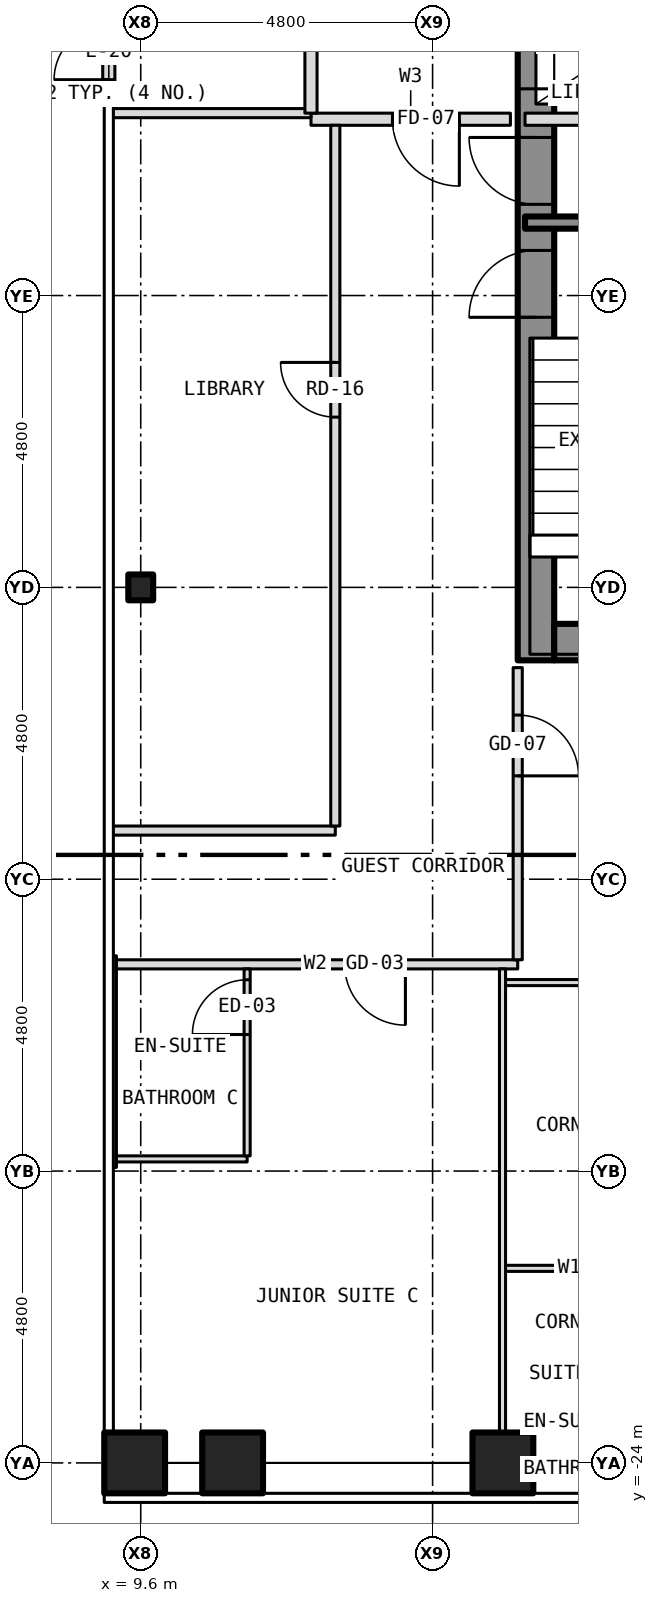
"""IFC4 building model, lengths in metres.
Left out: names, types, materials, properties, quantities, classifications, styles, units other than length and angle.
Written with IfcOpenShell. Run it as: python <this file> out.ifc"""

import sys

from ifc_helpers import new_model, si_unit, direction, frame, frame_2d, origin, origin_2d, place, context, subcontext, project, spatial, rectangle, hollow_rectangle, i_section, extrude, element, fill, save


model = new_model("IFC4")
c1 = context("Model", 3, precision=1e-05, world=origin(), true_north=direction((0.0, 1.0)))
c2 = subcontext(c1, "Body", "Model", "MODEL_VIEW")
j1 = project(units=[si_unit("LENGTHUNIT", "METRE"), si_unit("PLANEANGLEUNIT", "RADIAN")], contexts=[c1])
p1 = place(None, origin())
s1 = spatial("IfcSite", under=j1, at=p1, CompositionType="ELEMENT")
p2 = place(p1, origin())
s2 = spatial("IfcBuilding", under=s1, at=p2, CompositionType="ELEMENT")
p3 = place(p2, frame((0.0, 0.0, 63.5)))
s3 = spatial("IfcBuildingStorey", under=s2, at=p3, CompositionType="ELEMENT", Elevation=63.5)
for number, where, z_axis, x_axis in (
    (1, (11.111, -24.0, -0.15), (0.0, 0.0, 1.0), (1.0, 0.0, 0.0)),
    (2, (15.556, -24.0, -0.15), (0.0, 0.0, 1.0), (1.0, 0.0, 0.0)),
    (3, (9.5, -24.0, -0.15), (0.0, 0.0, 1.0), (1.0, 0.0, 0.0)),
):
    element("IfcColumn", number, at=place(p3, frame(where, z_axis=z_axis, x_axis=x_axis)), inside=s3, PredefinedType="COLUMN", context=c2, shape_type="SweptSolid", body=[
        extrude(hollow_rectangle(XDim=1.0, YDim=1.0, WallThickness=0.06, at=origin_2d()), origin(), (0.0, 0.0, 1.0), 3.5),
    ])
p4 = place(p3, frame((9.6, -9.6, -0.15), z_axis=(0.0, 0.0, 1.0), x_axis=(1.0, 0.0, 0.0)))
e4 = element("IfcColumn", 4, at=p4, inside=s3, PredefinedType="COLUMN", context=c2, shape_type="SweptSolid", body=[
    extrude(i_section(OverallWidth=0.409, OverallDepth=0.424, WebThickness=0.033, FlangeThickness=0.052, at=origin_2d()), origin(), (0.0, 0.0, 1.0), 3.5),
])
p5 = place(p3, frame((16.1, -10.8, 0.0), z_axis=(0.0, 0.0, 1.0), x_axis=(0.0, 1.0, 0.0)))
e5 = element("IfcWall", 5, at=p5, inside=s3, PredefinedType="SHEAR", context=c2, shape_type="SweptSolid", body=[
    extrude(rectangle(XDim=21.6, YDim=0.6, at=frame_2d((10.8, 0.0))), origin(), (0.0, 0.0, 1.0), 3.25),
])
p6 = place(p5, frame((9.4, 0.0, 0.0)))
e6 = element("IfcOpeningElement", 6, at=p6, cuts=e5, PredefinedType="OPENING", context=c2, shape_type="SweptSolid", body=[
    extrude(rectangle(XDim=1.1, YDim=2.1, at=frame_2d((0.55, 1.05))), frame((0.0, 0.312, 0.0), z_axis=(0.0, -1.0, 0.0), x_axis=(1.0, 0.0, 0.0)), (0.0, 0.0, 1.0), 0.624),
])
p7 = place(p5, frame((11.5, 0.0, 0.0)))
e7 = element("IfcOpeningElement", 7, at=p7, cuts=e5, PredefinedType="OPENING", context=c2, shape_type="SweptSolid", body=[
    extrude(rectangle(XDim=1.1, YDim=2.1, at=frame_2d((0.55, 1.05))), frame((0.0, 0.312, 0.0), z_axis=(0.0, -1.0, 0.0), x_axis=(1.0, 0.0, 0.0)), (0.0, 0.0, 1.0), 0.624),
])
p8 = place(p5, frame((13.6, 0.0, 0.0)))
e8 = element("IfcOpeningElement", 8, at=p8, cuts=e5, PredefinedType="OPENING", context=c2, shape_type="SweptSolid", body=[
    extrude(rectangle(XDim=1.1, YDim=2.1, at=frame_2d((0.55, 1.05))), frame((0.0, 0.312, 0.0), z_axis=(0.0, -1.0, 0.0), x_axis=(1.0, 0.0, 0.0)), (0.0, 0.0, 1.0), 0.624),
])
p9 = place(p5, frame((15.7, 0.0, 0.0)))
e9 = element("IfcOpeningElement", 9, at=p9, cuts=e5, PredefinedType="OPENING", context=c2, shape_type="SweptSolid", body=[
    extrude(rectangle(XDim=1.1, YDim=2.1, at=frame_2d((0.55, 1.05))), frame((0.0, 0.312, 0.0), z_axis=(0.0, -1.0, 0.0), x_axis=(1.0, 0.0, 0.0)), (0.0, 0.0, 1.0), 0.624),
])
p10 = place(p5, frame((17.8, 0.0, 0.0)))
e10 = element("IfcOpeningElement", 10, at=p10, cuts=e5, PredefinedType="OPENING", context=c2, shape_type="SweptSolid", body=[
    extrude(rectangle(XDim=1.1, YDim=2.1, at=frame_2d((0.55, 1.05))), frame((0.0, 0.312, 0.0), z_axis=(0.0, -1.0, 0.0), x_axis=(1.0, 0.0, 0.0)), (0.0, 0.0, 1.0), 0.624),
])
p11 = place(p5, frame((5.642, 0.0, 0.0)))
e11 = element("IfcOpeningElement", 11, at=p11, cuts=e5, PredefinedType="OPENING", context=c2, shape_type="SweptSolid", body=[
    extrude(rectangle(XDim=1.1, YDim=2.1, at=frame_2d((0.55, 1.05))), frame((0.0, 0.312, 0.0), z_axis=(0.0, -1.0, 0.0), x_axis=(1.0, 0.0, 0.0)), (0.0, 0.0, 1.0), 0.624),
])
p12 = place(p5, frame((7.5, 0.0, 0.0)))
e12 = element("IfcOpeningElement", 12, at=p12, cuts=e5, PredefinedType="OPENING", context=c2, shape_type="SweptSolid", body=[
    extrude(rectangle(XDim=1.1, YDim=2.1, at=frame_2d((0.55, 1.05))), frame((0.0, 0.312, 0.0), z_axis=(0.0, -1.0, 0.0), x_axis=(1.0, 0.0, 0.0)), (0.0, 0.0, 1.0), 0.624),
])
p13 = place(p3, frame((16.4, -10.5, 0.0), z_axis=(0.0, 0.0, 1.0), x_axis=(1.0, 0.0, 0.0)))
e13 = element("IfcWall", 13, at=p13, inside=s3, PredefinedType="SHEAR", context=c2, shape_type="SweptSolid", body=[
    extrude(rectangle(XDim=7.0, YDim=0.6, at=frame_2d((3.5, 0.0))), origin(), (0.0, 0.0, 1.0), 3.25),
])
p14 = place(p3, frame((9.075, -1.4, 0.0), z_axis=(0.0, 0.0, 1.0), x_axis=(0.0, 1.0, 0.0)))
e14 = element("IfcWall", 14, at=p14, inside=s3, PredefinedType="SOLIDWALL", context=c2, shape_type="SweptSolid", body=[
    extrude(rectangle(XDim=2.8, YDim=0.2, at=frame_2d((1.4, 0.0))), origin(), (0.0, 0.0, 1.0), 3.5),
])
p15 = place(p14, frame((0.15, 0.0, 0.0)))
e15 = element("IfcOpeningElement", 15, at=p15, cuts=e14, PredefinedType="OPENING", context=c2, shape_type="SweptSolid", body=[
    extrude(rectangle(XDim=0.9, YDim=2.1, at=frame_2d((0.45, 1.05))), frame((0.0, 0.112, 0.0), z_axis=(0.0, -1.0, 0.0), x_axis=(1.0, 0.0, 0.0)), (0.0, 0.0, 1.0), 0.224),
])
p16 = place(p14, frame((1.75, 0.0, 0.0)))
e16 = element("IfcOpeningElement", 16, at=p16, cuts=e14, PredefinedType="OPENING", context=c2, shape_type="SweptSolid", body=[
    extrude(rectangle(XDim=0.9, YDim=2.1, at=frame_2d((0.45, 1.05))), frame((0.0, 0.112, 0.0), z_axis=(0.0, -1.0, 0.0), x_axis=(1.0, 0.0, 0.0)), (0.0, 0.0, 1.0), 0.224),
])
p17 = place(p3, frame((15.55, -20.8, 0.0), z_axis=(0.0, 0.0, 1.0), x_axis=(1.0, 0.0, 0.0)))
e17 = element("IfcWall", 17, at=p17, inside=s3, PredefinedType="PARTITIONING", context=c2, shape_type="SweptSolid", body=[
    extrude(rectangle(XDim=2.2, YDim=0.1, at=frame_2d((1.1, 0.0))), origin(), (0.0, 0.0, 1.0), 3.35),
])
p18 = place(p3, frame((9.15, -19.0, 0.0), z_axis=(0.0, 0.0, 1.0), x_axis=(1.0, 0.0, 0.0)))
e18 = element("IfcWall", 18, at=p18, inside=s3, PredefinedType="PARTITIONING", context=c2, shape_type="SweptSolid", body=[
    extrude(rectangle(XDim=2.2, YDim=0.1, at=frame_2d((1.1, 0.0))), origin(), (0.0, 0.0, 1.0), 3.35),
])
p19 = place(p3, frame((15.55, -16.1, 0.0), z_axis=(0.0, 0.0, 1.0), x_axis=(1.0, 0.0, 0.0)))
e19 = element("IfcWall", 19, at=p19, inside=s3, PredefinedType="PARTITIONING", context=c2, shape_type="SweptSolid", body=[
    extrude(rectangle(XDim=8.33, YDim=0.1, at=frame_2d((4.165, 0.0))), origin(), (0.0, 0.0, 1.0), 3.35),
])
p20 = place(p19, frame((3.778, 0.0, 0.0)))
e20 = element("IfcOpeningElement", 20, at=p20, cuts=e19, PredefinedType="OPENING", context=c2, shape_type="SweptSolid", body=[
    extrude(rectangle(XDim=0.9, YDim=2.1, at=frame_2d((0.45, 1.05))), frame((0.0, 0.062, 0.0), z_axis=(0.0, -1.0, 0.0), x_axis=(1.0, 0.0, 0.0)), (0.0, 0.0, 1.0), 0.124),
])
p21 = place(p3, frame((9.15, -15.8, 0.0), z_axis=(0.0, 0.0, 1.0), x_axis=(1.0, 0.0, 0.0)))
e21 = element("IfcWall", 21, at=p21, inside=s3, PredefinedType="PARTITIONING", context=c2, shape_type="SweptSolid", body=[
    extrude(rectangle(XDim=6.65, YDim=0.15, at=frame_2d((3.325, 0.0))), origin(), (0.0, 0.0, 1.0), 3.35),
])
p22 = place(p21, frame((3.803, 0.0, 0.0)))
e22 = element("IfcOpeningElement", 22, at=p22, cuts=e21, PredefinedType="OPENING", context=c2, shape_type="SweptSolid", body=[
    extrude(rectangle(XDim=1.0, YDim=2.1, at=frame_2d((0.5, 1.05))), frame((0.0, 0.087, 0.0), z_axis=(0.0, -1.0, 0.0), x_axis=(1.0, 0.0, 0.0)), (0.0, 0.0, 1.0), 0.174),
])
p23 = place(p3, frame((9.12, -13.6, 0.0), z_axis=(0.0, 0.0, 1.0), x_axis=(1.0, 0.0, 0.0)))
e23 = element("IfcWall", 23, at=p23, inside=s3, PredefinedType="PARTITIONING", context=c2, shape_type="SweptSolid", body=[
    extrude(rectangle(XDim=3.68, YDim=0.15, at=frame_2d((1.84, 0.0))), origin(), (0.0, 0.0, 1.0), 3.35),
])
p24 = place(p3, frame((15.92, -3.6, 0.0), z_axis=(0.0, 0.0, 1.0), x_axis=(1.0, 0.0, 0.0)))
e24 = element("IfcWall", 24, at=p24, inside=s3, PredefinedType="SHEAR", context=c2, shape_type="SweptSolid", body=[
    extrude(rectangle(XDim=4.08, YDim=0.2, at=frame_2d((2.04, 0.0))), origin(), (0.0, 0.0, 1.0), 3.25),
])
p25 = place(p3, frame((12.4, -1.9, 0.0), z_axis=(0.0, 0.0, 1.0), x_axis=(1.0, 0.0, 0.0)))
e25 = element("IfcWall", 25, at=p25, inside=s3, PredefinedType="PARTITIONING", context=c2, shape_type="SweptSolid", body=[
    extrude(rectangle(XDim=3.28, YDim=0.2, at=frame_2d((1.64, 0.0))), origin(), (0.0, 0.0, 1.0), 3.35),
])
p26 = place(p25, frame((1.34, 0.0, 0.0)))
e26 = element("IfcOpeningElement", 26, at=p26, cuts=e25, PredefinedType="OPENING", context=c2, shape_type="SweptSolid", body=[
    extrude(rectangle(XDim=1.1, YDim=2.1, at=frame_2d((0.55, 1.05))), frame((0.0, 0.112, 0.0), z_axis=(0.0, -1.0, 0.0), x_axis=(1.0, 0.0, 0.0)), (0.0, 0.0, 1.0), 0.224),
])
p27 = place(p3, frame((15.92, -1.9, 0.0), z_axis=(0.0, 0.0, 1.0), x_axis=(1.0, 0.0, 0.0)))
e27 = element("IfcWall", 27, at=p27, inside=s3, PredefinedType="PARTITIONING", context=c2, shape_type="SweptSolid", body=[
    extrude(rectangle(XDim=7.96, YDim=0.2, at=frame_2d((3.98, 0.0))), origin(), (0.0, 0.0, 1.0), 3.25),
])
p28 = place(p27, frame((3.74, 0.0, 0.0)))
e28 = element("IfcOpeningElement", 28, at=p28, cuts=e27, PredefinedType="OPENING", context=c2, shape_type="SweptSolid", body=[
    extrude(rectangle(XDim=0.9, YDim=2.1, at=frame_2d((0.45, 1.05))), frame((0.0, 0.112, 0.0), z_axis=(0.0, -1.0, 0.0), x_axis=(1.0, 0.0, 0.0)), (0.0, 0.0, 1.0), 0.224),
])
p29 = place(p3, frame((9.12, -1.8, 0.0), z_axis=(0.0, 0.0, 1.0), x_axis=(1.0, 0.0, 0.0)))
e29 = element("IfcWall", 29, at=p29, inside=s3, PredefinedType="PARTITIONING", context=c2, shape_type="SweptSolid", body=[
    extrude(rectangle(XDim=3.28, YDim=0.15, at=frame_2d((1.64, 0.0))), origin(), (0.0, 0.0, 1.0), 3.35),
])
p30 = place(p3, frame((9.15, -19.14, 0.0), z_axis=(0.0, 0.0, 1.0), x_axis=(0.0, 1.0, 0.0)))
e30 = element("IfcWall", 30, at=p30, inside=s3, PredefinedType="PARTITIONING", context=c2, shape_type="SweptSolid", body=[
    extrude(rectangle(XDim=3.48, YDim=0.1, at=frame_2d((1.74, 0.0))), origin(), (0.0, 0.0, 1.0), 2.733),
])
p31 = place(p3, frame((11.35, -18.95, 0.0), z_axis=(0.0, 0.0, 1.0), x_axis=(0.0, 1.0, 0.0)))
e31 = element("IfcWall", 31, at=p31, inside=s3, PredefinedType="PARTITIONING", context=c2, shape_type="SweptSolid", body=[
    extrude(rectangle(XDim=3.075, YDim=0.1, at=frame_2d((1.538, 0.0))), origin(), (0.0, 0.0, 1.0), 3.35),
])
p32 = place(p31, frame((1.996, 0.0, 0.0)))
e32 = element("IfcOpeningElement", 32, at=p32, cuts=e31, PredefinedType="OPENING", context=c2, shape_type="SweptSolid", body=[
    extrude(rectangle(XDim=0.9, YDim=2.1, at=frame_2d((0.45, 1.05))), frame((0.0, 0.062, 0.0), z_axis=(0.0, -1.0, 0.0), x_axis=(1.0, 0.0, 0.0)), (0.0, 0.0, 1.0), 0.124),
])
p33 = place(p3, frame((12.4, -1.8, 0.0), z_axis=(0.0, 0.0, 1.0), x_axis=(0.0, 1.0, 0.0)))
e33 = element("IfcWall", 33, at=p33, inside=s3, PredefinedType="PARTITIONING", context=c2, shape_type="SweptSolid", body=[
    extrude(rectangle(XDim=4.0, YDim=0.2, at=frame_2d((2.0, 0.0))), origin(), (0.0, 0.0, 1.0), 3.35),
])
p34 = place(p33, frame((1.25, 0.0, 0.0)))
e34 = element("IfcOpeningElement", 34, at=p34, cuts=e33, PredefinedType="OPENING", context=c2, shape_type="SweptSolid", body=[
    extrude(rectangle(XDim=1.1, YDim=2.1, at=frame_2d((0.55, 1.05))), frame((0.0, 0.112, 0.0), z_axis=(0.0, -1.0, 0.0), x_axis=(1.0, 0.0, 0.0)), (0.0, 0.0, 1.0), 0.224),
])
p35 = place(p3, frame((12.8, -13.525, 0.0), z_axis=(0.0, 0.0, 1.0), x_axis=(0.0, 1.0, 0.0)))
e35 = element("IfcWall", 35, at=p35, inside=s3, PredefinedType="PARTITIONING", context=c2, shape_type="SweptSolid", body=[
    extrude(rectangle(XDim=11.525, YDim=0.15, at=frame_2d((5.762, 0.0))), origin(), (0.0, 0.0, 1.0), 3.35),
])
p36 = place(p35, frame((6.725, 0.0, 0.0)))
e36 = element("IfcOpeningElement", 36, at=p36, cuts=e35, PredefinedType="OPENING", context=c2, shape_type="SweptSolid", body=[
    extrude(rectangle(XDim=0.9, YDim=2.1, at=frame_2d((0.45, 1.05))), frame((0.0, 0.087, 0.0), z_axis=(0.0, -1.0, 0.0), x_axis=(1.0, 0.0, 0.0)), (0.0, 0.0, 1.0), 0.174),
])
p37 = place(p3, frame((15.55, -23.88, 0.0), z_axis=(0.0, 0.0, 1.0), x_axis=(0.0, 1.0, 0.0)))
e37 = element("IfcWall", 37, at=p37, inside=s3, PredefinedType="PARTITIONING", context=c2, shape_type="SweptSolid", body=[
    extrude(rectangle(XDim=8.005, YDim=0.1, at=frame_2d((4.002, 0.0))), origin(), (0.0, 0.0, 1.0), 3.35),
])
p38 = place(p3, frame((15.8, -15.725, 0.0), z_axis=(0.0, 0.0, 1.0), x_axis=(0.0, 1.0, 0.0)))
e38 = element("IfcWall", 38, at=p38, inside=s3, PredefinedType="PARTITIONING", context=c2, shape_type="SweptSolid", body=[
    extrude(rectangle(XDim=4.805, YDim=0.15, at=frame_2d((2.403, 0.0))), origin(), (0.0, 0.0, 1.0), 3.35),
])
p39 = place(p38, frame((3.025, 0.0, 0.0)))
e39 = element("IfcOpeningElement", 39, at=p39, cuts=e38, PredefinedType="OPENING", context=c2, shape_type="SweptSolid", body=[
    extrude(rectangle(XDim=1.0, YDim=2.1, at=frame_2d((0.5, 1.05))), frame((0.0, 0.087, 0.0), z_axis=(0.0, -1.0, 0.0), x_axis=(1.0, 0.0, 0.0)), (0.0, 0.0, 1.0), 0.174),
])
p40 = place(p15, origin())
e40 = element("IfcDoor", 40, at=p40, inside=s3, OperationType="SINGLE_SWING_LEFT", PredefinedType="DOOR", context=c2, shape_type="SweptSolid", body=[
    extrude(rectangle(XDim=0.9, YDim=2.1, at=frame_2d((0.45, 1.05))), frame((0.0, 0.025, 0.0), z_axis=(0.0, -1.0, 0.0), x_axis=(1.0, 0.0, 0.0)), (0.0, 0.0, 1.0), 0.05),
])
fill(e15, e40)
p41 = place(p6, origin())
e41 = element("IfcDoor", 41, at=p41, inside=s3, OperationType="SLIDING_TO_LEFT", PredefinedType="DOOR", context=c2, shape_type="SweptSolid", body=[
    extrude(rectangle(XDim=1.1, YDim=2.1, at=frame_2d((0.55, 1.05))), frame((0.0, 0.025, 0.0), z_axis=(0.0, -1.0, 0.0), x_axis=(1.0, 0.0, 0.0)), (0.0, 0.0, 1.0), 0.05),
])
fill(e6, e41)
p42 = place(p11, origin())
e42 = element("IfcDoor", 42, at=p42, inside=s3, OperationType="SINGLE_SWING_LEFT", PredefinedType="DOOR", context=c2, shape_type="SweptSolid", body=[
    extrude(rectangle(XDim=1.1, YDim=2.1, at=frame_2d((0.55, 1.05))), frame((0.0, 0.025, 0.0), z_axis=(0.0, -1.0, 0.0), x_axis=(1.0, 0.0, 0.0)), (0.0, 0.0, 1.0), 0.05),
])
fill(e11, e42)
p43 = place(p12, origin())
e43 = element("IfcDoor", 43, at=p43, inside=s3, OperationType="SINGLE_SWING_RIGHT", PredefinedType="DOOR", context=c2, shape_type="SweptSolid", body=[
    extrude(rectangle(XDim=1.1, YDim=2.1, at=frame_2d((0.55, 1.05))), frame((0.0, 0.025, 0.0), z_axis=(0.0, -1.0, 0.0), x_axis=(1.0, 0.0, 0.0)), (0.0, 0.0, 1.0), 0.05),
])
fill(e12, e43)
p44 = place(p26, origin())
e44 = element("IfcDoor", 44, at=p44, inside=s3, OperationType="SINGLE_SWING_RIGHT", PredefinedType="DOOR", context=c2, shape_type="SweptSolid", body=[
    extrude(rectangle(XDim=1.1, YDim=2.1, at=frame_2d((0.55, 1.05))), frame((0.0, 0.025, 0.0), z_axis=(0.0, -1.0, 0.0), x_axis=(1.0, 0.0, 0.0)), (0.0, 0.0, 1.0), 0.05),
])
fill(e26, e44)
p45 = place(p22, origin())
e45 = element("IfcDoor", 45, at=p45, inside=s3, OperationType="SINGLE_SWING_RIGHT", PredefinedType="DOOR", context=c2, shape_type="SweptSolid", body=[
    extrude(rectangle(XDim=1.0, YDim=2.1, at=frame_2d((0.5, 1.05))), frame((0.0, 0.025, 0.0), z_axis=(0.0, -1.0, 0.0), x_axis=(1.0, 0.0, 0.0)), (0.0, 0.0, 1.0), 0.05),
])
fill(e22, e45)
p46 = place(p32, origin())
e46 = element("IfcDoor", 46, at=p46, inside=s3, OperationType="SINGLE_SWING_LEFT", PredefinedType="DOOR", context=c2, shape_type="SweptSolid", body=[
    extrude(rectangle(XDim=0.9, YDim=2.1, at=frame_2d((0.45, 1.05))), frame((0.0, 0.025, 0.0), z_axis=(0.0, -1.0, 0.0), x_axis=(1.0, 0.0, 0.0)), (0.0, 0.0, 1.0), 0.05),
])
fill(e32, e46)
p47 = place(p39, origin())
e47 = element("IfcDoor", 47, at=p47, inside=s3, OperationType="SINGLE_SWING_LEFT", PredefinedType="DOOR", context=c2, shape_type="SweptSolid", body=[
    extrude(rectangle(XDim=1.0, YDim=2.1, at=frame_2d((0.5, 1.05))), frame((0.0, 0.025, 0.0), z_axis=(0.0, -1.0, 0.0), x_axis=(1.0, 0.0, 0.0)), (0.0, 0.0, 1.0), 0.05),
])
fill(e39, e47)
p48 = place(p36, origin())
e48 = element("IfcDoor", 48, at=p48, inside=s3, OperationType="SINGLE_SWING_RIGHT", PredefinedType="DOOR", context=c2, shape_type="SweptSolid", body=[
    extrude(rectangle(XDim=0.9, YDim=2.1, at=frame_2d((0.45, 1.05))), frame((0.0, 0.025, 0.0), z_axis=(0.0, -1.0, 0.0), x_axis=(1.0, 0.0, 0.0)), (0.0, 0.0, 1.0), 0.05),
])
fill(e36, e48)
save(model, sys.argv[1])
